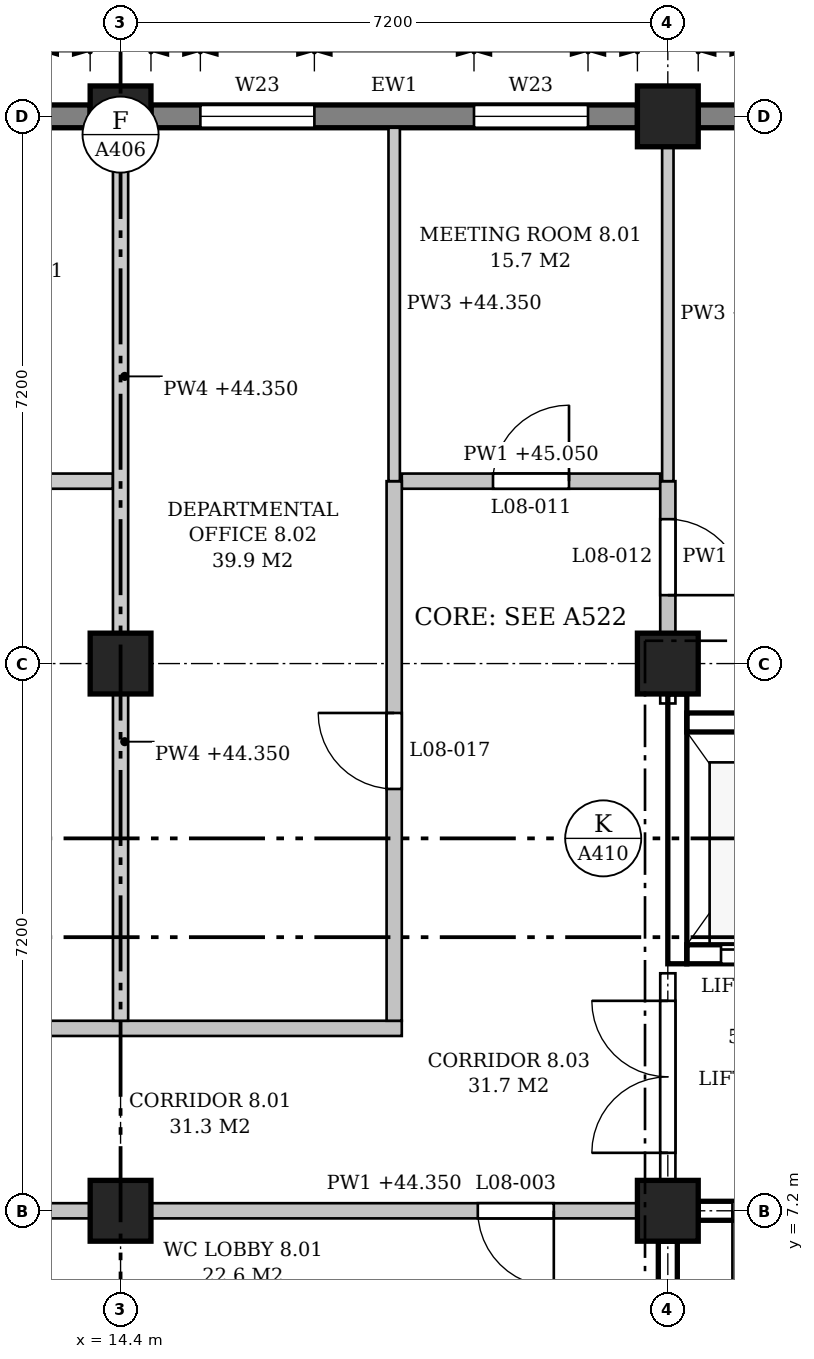
"""IFC4 building model, lengths in metres.
Left out: names, types, materials, properties, quantities, classifications, styles, units other than length and angle.
Written with IfcOpenShell. Run it as: python <this file> out.ifc"""

import sys

from ifc_helpers import new_model, si_unit, direction, frame, frame_2d, origin, origin_2d, place, context, subcontext, project, spatial, polyline, rectangle, outline, extrude, element, fill, save


model = new_model("IFC4")
c1 = context("Model", 3, precision=1e-05, world=origin(), true_north=direction((0.0, 1.0)))
c2 = subcontext(c1, "Body", "Model", "MODEL_VIEW")
j1 = project(units=[si_unit("LENGTHUNIT", "METRE"), si_unit("PLANEANGLEUNIT", "RADIAN")], contexts=[c1])
p1 = place(None, origin())
s1 = spatial("IfcSite", under=j1, at=p1, CompositionType="ELEMENT")
p2 = place(p1, origin())
s2 = spatial("IfcBuilding", under=s1, at=p2, CompositionType="ELEMENT")
p3 = place(p2, frame((0.0, 0.0, 40.8)))
s3 = spatial("IfcBuildingStorey", under=s2, at=p3, CompositionType="ELEMENT", Elevation=40.8)
for number, where, z_axis, x_axis in (
    (1, (14.4, 7.2, 0.0), (0.0, 0.0, 1.0), (1.0, 0.0, 0.0)),
    (2, (14.4, 14.4, 0.0), (0.0, 0.0, 1.0), (1.0, 0.0, 0.0)),
    (3, (14.4, 21.6, 0.0), (0.0, 0.0, 1.0), (1.0, 0.0, 0.0)),
    (4, (21.6, 7.2, 0.0), (0.0, 0.0, 1.0), (1.0, 0.0, 0.0)),
    (5, (21.6, 14.4, 0.0), (0.0, 0.0, 1.0), (1.0, 0.0, 0.0)),
    (6, (21.6, 21.6, 0.0), (0.0, 0.0, 1.0), (1.0, 0.0, 0.0)),
):
    element("IfcColumn", number, at=place(p3, frame(where, z_axis=z_axis, x_axis=x_axis)), inside=s3, PredefinedType="COLUMN", context=c2, shape_type="SweptSolid", body=[
        extrude(rectangle(XDim=0.8, YDim=0.8, at=origin_2d()), origin(), (0.0, 0.0, 1.0), 4.5),
    ])
p4 = place(p3, frame((28.4, 21.6, 0.0), z_axis=(0.0, 0.0, 1.0), x_axis=(-1.0, 0.0, 0.0)))
e7 = element("IfcWall", 7, at=p4, inside=s3, PredefinedType="STANDARD", context=c2, shape_type="SweptSolid", body=[
    extrude(rectangle(XDim=6.4, YDim=0.3, at=frame_2d((3.2, 0.0))), origin(), (0.0, 0.0, 1.0), 3.65),
])
p5 = place(p4, frame((0.65, 0.0, 0.9)))
e8 = element("IfcOpeningElement", 8, at=p5, cuts=e7, PredefinedType="OPENING", context=c2, shape_type="SweptSolid", body=[
    extrude(outline(polyline([(0.0, 0.0), (1.5, 0.0), (1.5, 1.95), (0.75, 2.7), (0.0, 1.95), (0.0, 0.0)])), frame((0.0, 0.16, 0.0), z_axis=(0.0, -1.0, 0.0), x_axis=(1.0, 0.0, 0.0)), (0.0, 0.0, 1.0), 0.32),
])
p6 = place(p4, frame((4.25, 0.0, 0.9)))
e9 = element("IfcOpeningElement", 9, at=p6, cuts=e7, PredefinedType="OPENING", context=c2, shape_type="SweptSolid", body=[
    extrude(outline(polyline([(0.0, 0.0), (1.5, 0.0), (1.5, 1.95), (0.75, 2.7), (0.0, 1.95), (0.0, 0.0)])), frame((0.0, 0.16, 0.0), z_axis=(0.0, -1.0, 0.0), x_axis=(1.0, 0.0, 0.0)), (0.0, 0.0, 1.0), 0.32),
])
p7 = place(p3, frame((21.2, 21.6, 0.0), z_axis=(0.0, 0.0, 1.0), x_axis=(-1.0, 0.0, 0.0)))
e10 = element("IfcWall", 10, at=p7, inside=s3, PredefinedType="STANDARD", context=c2, shape_type="SweptSolid", body=[
    extrude(rectangle(XDim=6.4, YDim=0.3, at=frame_2d((3.2, 0.0))), origin(), (0.0, 0.0, 1.0), 3.65),
])
p8 = place(p7, frame((0.65, 0.0, 0.9)))
e11 = element("IfcOpeningElement", 11, at=p8, cuts=e10, PredefinedType="OPENING", context=c2, shape_type="SweptSolid", body=[
    extrude(outline(polyline([(0.0, 0.0), (1.5, 0.0), (1.5, 1.95), (0.75, 2.7), (0.0, 1.95), (0.0, 0.0)])), frame((0.0, 0.16, 0.0), z_axis=(0.0, -1.0, 0.0), x_axis=(1.0, 0.0, 0.0)), (0.0, 0.0, 1.0), 0.32),
])
p9 = place(p7, frame((4.25, 0.0, 0.9)))
e12 = element("IfcOpeningElement", 12, at=p9, cuts=e10, PredefinedType="OPENING", context=c2, shape_type="SweptSolid", body=[
    extrude(outline(polyline([(0.0, 0.0), (1.5, 0.0), (1.5, 1.95), (0.75, 2.7), (0.0, 1.95), (0.0, 0.0)])), frame((0.0, 0.16, 0.0), z_axis=(0.0, -1.0, 0.0), x_axis=(1.0, 0.0, 0.0)), (0.0, 0.0, 1.0), 0.32),
])
p10 = place(p3, frame((14.0, 21.6, 0.0), z_axis=(0.0, 0.0, 1.0), x_axis=(-1.0, 0.0, 0.0)))
e13 = element("IfcWall", 13, at=p10, inside=s3, PredefinedType="STANDARD", context=c2, shape_type="SweptSolid", body=[
    extrude(rectangle(XDim=6.4, YDim=0.3, at=frame_2d((3.2, 0.0))), origin(), (0.0, 0.0, 1.0), 3.65),
])
p11 = place(p10, frame((0.65, 0.0, 0.9)))
e14 = element("IfcOpeningElement", 14, at=p11, cuts=e13, PredefinedType="OPENING", context=c2, shape_type="SweptSolid", body=[
    extrude(outline(polyline([(0.0, 0.0), (1.5, 0.0), (1.5, 1.95), (0.75, 2.7), (0.0, 1.95), (0.0, 0.0)])), frame((0.0, 0.16, 0.0), z_axis=(0.0, -1.0, 0.0), x_axis=(1.0, 0.0, 0.0)), (0.0, 0.0, 1.0), 0.32),
])
p12 = place(p10, frame((4.25, 0.0, 0.9)))
e15 = element("IfcOpeningElement", 15, at=p12, cuts=e13, PredefinedType="OPENING", context=c2, shape_type="SweptSolid", body=[
    extrude(outline(polyline([(0.0, 0.0), (1.5, 0.0), (1.5, 1.95), (0.75, 2.7), (0.0, 1.95), (0.0, 0.0)])), frame((0.0, 0.16, 0.0), z_axis=(0.0, -1.0, 0.0), x_axis=(1.0, 0.0, 0.0)), (0.0, 0.0, 1.0), 0.32),
])
p13 = place(p3, frame((22.0, 7.2, 0.0), z_axis=(0.0, 0.0, 1.0), x_axis=(1.0, 0.0, 0.0)))
e16 = element("IfcWall", 16, at=p13, inside=s3, PredefinedType="SHEAR", context=c2, shape_type="SweptSolid", body=[
    extrude(rectangle(XDim=6.4, YDim=0.25, at=frame_2d((3.2, 0.0))), origin(), (0.0, 0.0, 1.0), 3.55),
])
p14 = place(p13, frame((0.45, 0.0, 0.0)))
e17 = element("IfcOpeningElement", 17, at=p14, cuts=e16, PredefinedType="OPENING", context=c2, shape_type="SweptSolid", body=[
    extrude(rectangle(XDim=1.1, YDim=2.1, at=frame_2d((0.55, 1.05))), frame((0.0, 0.135, 0.0), z_axis=(0.0, -1.0, 0.0), x_axis=(1.0, 0.0, 0.0)), (0.0, 0.0, 1.0), 0.27),
])
p15 = place(p3, frame((21.6, 0.4, 0.0), z_axis=(0.0, 0.0, 1.0), x_axis=(0.0, 1.0, 0.0)))
e18 = element("IfcWall", 18, at=p15, inside=s3, PredefinedType="SHEAR", context=c2, shape_type="SweptSolid", body=[
    extrude(rectangle(XDim=6.4, YDim=0.25, at=frame_2d((3.2, 0.0))), origin(), (0.0, 0.0, 1.0), 3.55),
])
p16 = place(p3, frame((21.725, 10.45, -0.25), z_axis=(0.0, 0.0, 1.0), x_axis=(0.0, 1.0, 0.0)))
e19 = element("IfcWall", 19, at=p16, inside=s3, PredefinedType="SHEAR", context=c2, shape_type="SweptSolid", body=[
    extrude(rectangle(XDim=3.55, YDim=0.25, at=frame_2d((1.775, 0.0))), origin(), (0.0, 0.0, 1.0), 3.8),
])
p17 = place(p3, frame((21.85, 10.575, -0.25), z_axis=(0.0, 0.0, 1.0), x_axis=(1.0, 0.0, 0.0)))
e20 = element("IfcWall", 20, at=p17, inside=s3, PredefinedType="SHEAR", context=c2, shape_type="SweptSolid", body=[
    extrude(rectangle(XDim=2.0, YDim=0.25, at=frame_2d((1.0, 0.0))), origin(), (0.0, 0.0, 1.0), 4.5),
])
p18 = place(p17, frame((0.45, 0.0, 0.25)))
e21 = element("IfcOpeningElement", 21, at=p18, cuts=e20, PredefinedType="OPENING", context=c2, shape_type="SweptSolid", body=[
    extrude(rectangle(XDim=1.1, YDim=2.1, at=frame_2d((0.55, 1.05))), frame((0.0, 0.135, 0.0), z_axis=(0.0, -1.0, 0.0), x_axis=(1.0, 0.0, 0.0)), (0.0, 0.0, 1.0), 0.27),
])
p19 = place(p3, frame((21.85, 13.625, -0.25), z_axis=(0.0, 0.0, 1.0), x_axis=(1.0, 0.0, 0.0)))
e22 = element("IfcWall", 22, at=p19, inside=s3, PredefinedType="SHEAR", context=c2, shape_type="SweptSolid", body=[
    extrude(rectangle(XDim=2.0, YDim=0.25, at=frame_2d((1.0, 0.0))), origin(), (0.0, 0.0, 1.0), 4.5),
])
p20 = place(p3, frame((7.6, 7.2, 0.0), z_axis=(0.0, 0.0, 1.0), x_axis=(1.0, 0.0, 0.0)))
e23 = element("IfcWall", 23, at=p20, inside=s3, PredefinedType="PARTITIONING", context=c2, shape_type="SweptSolid", body=[
    extrude(rectangle(XDim=6.4, YDim=0.2, at=frame_2d((3.2, 0.0))), origin(), (0.0, 0.0, 1.0), 3.55),
])
p21 = place(p20, frame((2.7, 0.0, 0.0)))
e24 = element("IfcOpeningElement", 24, at=p21, cuts=e23, PredefinedType="OPENING", context=c2, shape_type="SweptSolid", body=[
    extrude(rectangle(XDim=1.0, YDim=2.1, at=frame_2d((0.5, 1.05))), frame((0.0, 0.11, 0.0), z_axis=(0.0, -1.0, 0.0), x_axis=(1.0, 0.0, 0.0)), (0.0, 0.0, 1.0), 0.22),
])
p22 = place(p3, frame((14.8, 7.2, 0.0), z_axis=(0.0, 0.0, 1.0), x_axis=(1.0, 0.0, 0.0)))
e25 = element("IfcWall", 25, at=p22, inside=s3, PredefinedType="PARTITIONING", context=c2, shape_type="SweptSolid", body=[
    extrude(rectangle(XDim=6.4, YDim=0.2, at=frame_2d((3.2, 0.0))), origin(), (0.0, 0.0, 1.0), 3.55),
])
p23 = place(p22, frame((4.3, 0.0, 0.0)))
e26 = element("IfcOpeningElement", 26, at=p23, cuts=e25, PredefinedType="OPENING", context=c2, shape_type="SweptSolid", body=[
    extrude(rectangle(XDim=1.0, YDim=2.1, at=frame_2d((0.5, 1.05))), frame((0.0, 0.11, 0.0), z_axis=(0.0, -1.0, 0.0), x_axis=(1.0, 0.0, 0.0)), (0.0, 0.0, 1.0), 0.22),
])
p24 = place(p3, frame((3.5, 9.6, 0.0), z_axis=(0.0, 0.0, 1.0), x_axis=(1.0, 0.0, 0.0)))
e27 = element("IfcWall", 27, at=p24, inside=s3, PredefinedType="PARTITIONING", context=c2, shape_type="SweptSolid", body=[
    extrude(outline(polyline([(0.0, 0.0), (14.6, 0.0), (14.6, 4.25), (11.125, 4.25), (11.125, 3.55), (10.675, 3.55), (10.675, 4.25), (3.925, 4.25), (3.925, 3.55), (3.475, 3.55), (3.475, 4.25), (0.0, 4.25), (0.0, 0.0)])), frame((0.0, 0.1, 0.0), z_axis=(0.0, -1.0, 0.0), x_axis=(1.0, 0.0, 0.0)), (0.0, 0.0, 1.0), 0.2),
])
p25 = place(p24, frame((5.0, 0.0, 0.0)))
e28 = element("IfcOpeningElement", 28, at=p25, cuts=e27, PredefinedType="OPENING", context=c2, shape_type="SweptSolid", body=[
    extrude(rectangle(XDim=1.0, YDim=2.1, at=frame_2d((0.5, 1.05))), frame((0.0, 0.11, 0.0), z_axis=(0.0, -1.0, 0.0), x_axis=(1.0, 0.0, 0.0)), (0.0, 0.0, 1.0), 0.22),
])
p26 = place(p3, frame((3.7, 16.8, 0.0), z_axis=(0.0, 0.0, 1.0), x_axis=(1.0, 0.0, 0.0)))
e29 = element("IfcWall", 29, at=p26, inside=s3, PredefinedType="PARTITIONING", context=c2, shape_type="SweptSolid", body=[
    extrude(outline(polyline([(0.0, 0.0), (10.6, 0.0), (10.6, 3.55), (10.475, 3.55), (10.475, 4.25), (3.725, 4.25), (3.725, 3.55), (3.275, 3.55), (3.275, 4.25), (0.0, 4.25), (0.0, 0.0)])), frame((0.0, 0.1, 0.0), z_axis=(0.0, -1.0, 0.0), x_axis=(1.0, 0.0, 0.0)), (0.0, 0.0, 1.0), 0.2),
])
p27 = place(p26, frame((1.25, 0.0, 0.0)))
e30 = element("IfcOpeningElement", 30, at=p27, cuts=e29, PredefinedType="OPENING", context=c2, shape_type="SweptSolid", body=[
    extrude(rectangle(XDim=1.0, YDim=2.1, at=frame_2d((0.5, 1.05))), frame((0.0, 0.11, 0.0), z_axis=(0.0, -1.0, 0.0), x_axis=(1.0, 0.0, 0.0)), (0.0, 0.0, 1.0), 0.22),
])
p28 = place(p26, frame((6.55, 0.0, 0.0)))
e31 = element("IfcOpeningElement", 31, at=p28, cuts=e29, PredefinedType="OPENING", context=c2, shape_type="SweptSolid", body=[
    extrude(rectangle(XDim=1.0, YDim=2.1, at=frame_2d((0.5, 1.05))), frame((0.0, 0.11, 0.0), z_axis=(0.0, -1.0, 0.0), x_axis=(1.0, 0.0, 0.0)), (0.0, 0.0, 1.0), 0.22),
])
p29 = place(p3, frame((18.1, 16.8, 0.0), z_axis=(0.0, 0.0, 1.0), x_axis=(1.0, 0.0, 0.0)))
e32 = element("IfcWall", 32, at=p29, inside=s3, PredefinedType="PARTITIONING", context=c2, shape_type="SweptSolid", body=[
    extrude(outline(polyline([(0.0, 0.0), (3.4, 0.0), (3.4, 3.55), (3.275, 3.55), (3.275, 4.25), (0.0, 4.25), (0.0, 0.0)])), frame((0.0, 0.1, 0.0), z_axis=(0.0, -1.0, 0.0), x_axis=(1.0, 0.0, 0.0)), (0.0, 0.0, 1.0), 0.2),
])
p30 = place(p29, frame((1.2, 0.0, 0.0)))
e33 = element("IfcOpeningElement", 33, at=p30, cuts=e32, PredefinedType="OPENING", context=c2, shape_type="SweptSolid", body=[
    extrude(rectangle(XDim=1.0, YDim=2.1, at=frame_2d((0.5, 1.05))), frame((0.0, 0.11, 0.0), z_axis=(0.0, -1.0, 0.0), x_axis=(1.0, 0.0, 0.0)), (0.0, 0.0, 1.0), 0.22),
])
p31 = place(p3, frame((14.4, 9.7, 0.0), z_axis=(0.0, 0.0, 1.0), x_axis=(0.0, 1.0, 0.0)))
e34 = element("IfcWall", 34, at=p31, inside=s3, PredefinedType="PARTITIONING", context=c2, shape_type="SweptSolid", body=[
    extrude(rectangle(XDim=4.3, YDim=0.2, at=frame_2d((2.15, 0.0))), origin(), (0.0, 0.0, 1.0), 3.55),
])
p32 = place(p3, frame((14.4, 14.8, 0.0), z_axis=(0.0, 0.0, 1.0), x_axis=(0.0, 1.0, 0.0)))
e35 = element("IfcWall", 35, at=p32, inside=s3, PredefinedType="PARTITIONING", context=c2, shape_type="SweptSolid", body=[
    extrude(rectangle(XDim=6.4, YDim=0.2, at=frame_2d((3.2, 0.0))), origin(), (0.0, 0.0, 1.0), 3.55),
])
p33 = place(p3, frame((18.0, 9.7, 0.0), z_axis=(0.0, 0.0, 1.0), x_axis=(0.0, 1.0, 0.0)))
e36 = element("IfcWall", 36, at=p33, inside=s3, PredefinedType="PARTITIONING", context=c2, shape_type="SweptSolid", body=[
    extrude(outline(polyline([(0.0, 0.0), (7.1, 0.0), (7.1, 4.25), (4.925, 4.25), (4.925, 3.55), (4.475, 3.55), (4.475, 4.25), (0.0, 4.25), (0.0, 0.0)])), frame((0.0, 0.1, 0.0), z_axis=(0.0, -1.0, 0.0), x_axis=(1.0, 0.0, 0.0)), (0.0, 0.0, 1.0), 0.2),
])
p34 = place(p33, frame((3.05, 0.0, 0.0)))
e37 = element("IfcOpeningElement", 37, at=p34, cuts=e36, PredefinedType="OPENING", context=c2, shape_type="SweptSolid", body=[
    extrude(rectangle(XDim=1.0, YDim=2.1, at=frame_2d((0.5, 1.05))), frame((0.0, 0.11, 0.0), z_axis=(0.0, -1.0, 0.0), x_axis=(1.0, 0.0, 0.0)), (0.0, 0.0, 1.0), 0.22),
])
p35 = place(p3, frame((18.0, 16.8, 0.0), z_axis=(0.0, 0.0, 1.0), x_axis=(0.0, 1.0, 0.0)))
e38 = element("IfcWall", 38, at=p35, inside=s3, PredefinedType="PARTITIONING", context=c2, shape_type="SweptSolid", body=[
    extrude(rectangle(XDim=4.65, YDim=0.15, at=frame_2d((2.325, 0.0))), origin(), (0.0, 0.0, 1.0), 3.55),
])
p36 = place(p3, frame((21.6, 7.6, 0.0), z_axis=(0.0, 0.0, 1.0), x_axis=(0.0, 1.0, 0.0)))
e39 = element("IfcWall", 39, at=p36, inside=s3, PredefinedType="PARTITIONING", context=c2, shape_type="SweptSolid", body=[
    extrude(rectangle(XDim=2.725, YDim=0.2, at=frame_2d((1.362, 0.0))), origin(), (0.0, 0.0, 1.0), 3.55),
])
p37 = place(p36, frame((0.362, 0.0, 0.0)))
e40 = element("IfcOpeningElement", 40, at=p37, cuts=e39, PredefinedType="OPENING", context=c2, shape_type="SweptSolid", body=[
    extrude(rectangle(XDim=2.0, YDim=2.4, at=frame_2d((1.0, 1.2))), frame((0.0, 0.11, 0.0), z_axis=(0.0, -1.0, 0.0), x_axis=(1.0, 0.0, 0.0)), (0.0, 0.0, 1.0), 0.22),
])
p38 = place(p3, frame((21.6, 13.875, 0.0), z_axis=(0.0, 0.0, 1.0), x_axis=(0.0, 1.0, 0.0)))
e41 = element("IfcWall", 41, at=p38, inside=s3, PredefinedType="PARTITIONING", context=c2, shape_type="SweptSolid", body=[
    extrude(rectangle(XDim=0.125, YDim=0.2, at=frame_2d((0.062, 0.0))), origin(), (0.0, 0.0, 1.0), 3.55),
])
p39 = place(p3, frame((21.6, 14.8, 0.0), z_axis=(0.0, 0.0, 1.0), x_axis=(0.0, 1.0, 0.0)))
e42 = element("IfcWall", 42, at=p39, inside=s3, PredefinedType="PARTITIONING", context=c2, shape_type="SweptSolid", body=[
    extrude(rectangle(XDim=2.0, YDim=0.2, at=frame_2d((1.0, 0.0))), origin(), (0.0, 0.0, 1.0), 3.55),
])
p40 = place(p39, frame((0.5, 0.0, 0.0)))
e43 = element("IfcOpeningElement", 43, at=p40, cuts=e42, PredefinedType="OPENING", context=c2, shape_type="SweptSolid", body=[
    extrude(rectangle(XDim=1.0, YDim=2.1, at=frame_2d((0.5, 1.05))), frame((0.0, 0.11, 0.0), z_axis=(0.0, -1.0, 0.0), x_axis=(1.0, 0.0, 0.0)), (0.0, 0.0, 1.0), 0.22),
])
p41 = place(p3, frame((21.6, 16.8, 0.0), z_axis=(0.0, 0.0, 1.0), x_axis=(0.0, 1.0, 0.0)))
e44 = element("IfcWall", 44, at=p41, inside=s3, PredefinedType="PARTITIONING", context=c2, shape_type="SweptSolid", body=[
    extrude(rectangle(XDim=4.4, YDim=0.15, at=frame_2d((2.2, 0.0))), origin(), (0.0, 0.0, 1.0), 3.55),
])
p42 = place(p8, origin())
e45 = element("IfcWindow", 45, at=p42, inside=s3, PartitioningType="SINGLE_PANEL", PredefinedType="WINDOW", context=c2, shape_type="SweptSolid", body=[
    extrude(outline(polyline([(0.0, 0.0), (1.5, 0.0), (1.5, 1.95), (0.75, 2.7), (0.0, 1.95), (0.0, 0.0)])), frame((0.0, 0.03, 0.0), z_axis=(0.0, -1.0, 0.0), x_axis=(1.0, 0.0, 0.0)), (0.0, 0.0, 1.0), 0.06),
])
fill(e11, e45)
p43 = place(p9, origin())
e46 = element("IfcWindow", 46, at=p43, inside=s3, PartitioningType="SINGLE_PANEL", PredefinedType="WINDOW", context=c2, shape_type="SweptSolid", body=[
    extrude(outline(polyline([(0.0, 0.0), (1.5, 0.0), (1.5, 1.95), (0.75, 2.7), (0.0, 1.95), (0.0, 0.0)])), frame((0.0, 0.03, 0.0), z_axis=(0.0, -1.0, 0.0), x_axis=(1.0, 0.0, 0.0)), (0.0, 0.0, 1.0), 0.06),
])
fill(e12, e46)
p44 = place(p14, frame((1.1, 0.0, 0.0), z_axis=(0.0, 0.0, 1.0), x_axis=(-1.0, 0.0, 0.0)))
e47 = element("IfcDoor", 47, at=p44, inside=s3, OperationType="SINGLE_SWING_RIGHT", PredefinedType="DOOR", context=c2, shape_type="SweptSolid", body=[
    extrude(rectangle(XDim=1.1, YDim=2.1, at=frame_2d((0.55, 1.05))), frame((0.0, 0.025, 0.0), z_axis=(0.0, -1.0, 0.0), x_axis=(1.0, 0.0, 0.0)), (0.0, 0.0, 1.0), 0.05),
])
fill(e17, e47)
p45 = place(p18, origin())
e48 = element("IfcDoor", 48, at=p45, inside=s3, OperationType="SLIDING_TO_LEFT", PredefinedType="DOOR", context=c2, shape_type="SweptSolid", body=[
    extrude(rectangle(XDim=1.1, YDim=2.1, at=frame_2d((0.55, 1.05))), frame((0.0, 0.025, 0.0), z_axis=(0.0, -1.0, 0.0), x_axis=(1.0, 0.0, 0.0)), (0.0, 0.0, 1.0), 0.05),
])
fill(e21, e48)
p46 = place(p37, origin())
e49 = element("IfcDoor", 49, at=p46, inside=s3, OperationType="DOUBLE_DOOR_SINGLE_SWING", PredefinedType="DOOR", context=c2, shape_type="SweptSolid", body=[
    extrude(rectangle(XDim=2.0, YDim=2.4, at=frame_2d((1.0, 1.2))), frame((0.0, 0.025, 0.0), z_axis=(0.0, -1.0, 0.0), x_axis=(1.0, 0.0, 0.0)), (0.0, 0.0, 1.0), 0.05),
])
fill(e40, e49)
p47 = place(p23, frame((1.0, 0.0, 0.0), z_axis=(0.0, 0.0, 1.0), x_axis=(-1.0, 0.0, 0.0)))
e50 = element("IfcDoor", 50, at=p47, inside=s3, OperationType="SINGLE_SWING_LEFT", PredefinedType="DOOR", context=c2, shape_type="SweptSolid", body=[
    extrude(rectangle(XDim=1.0, YDim=2.1, at=frame_2d((0.5, 1.05))), frame((0.0, 0.025, 0.0), z_axis=(0.0, -1.0, 0.0), x_axis=(1.0, 0.0, 0.0)), (0.0, 0.0, 1.0), 0.05),
])
fill(e26, e50)
p48 = place(p30, origin())
e51 = element("IfcDoor", 51, at=p48, inside=s3, OperationType="SINGLE_SWING_RIGHT", PredefinedType="DOOR", context=c2, shape_type="SweptSolid", body=[
    extrude(rectangle(XDim=1.0, YDim=2.1, at=frame_2d((0.5, 1.05))), frame((0.0, 0.025, 0.0), z_axis=(0.0, -1.0, 0.0), x_axis=(1.0, 0.0, 0.0)), (0.0, 0.0, 1.0), 0.05),
])
fill(e33, e51)
p49 = place(p40, frame((1.0, 0.0, 0.0), z_axis=(0.0, 0.0, 1.0), x_axis=(-1.0, 0.0, 0.0)))
e52 = element("IfcDoor", 52, at=p49, inside=s3, OperationType="SINGLE_SWING_RIGHT", PredefinedType="DOOR", context=c2, shape_type="SweptSolid", body=[
    extrude(rectangle(XDim=1.0, YDim=2.1, at=frame_2d((0.5, 1.05))), frame((0.0, 0.025, 0.0), z_axis=(0.0, -1.0, 0.0), x_axis=(1.0, 0.0, 0.0)), (0.0, 0.0, 1.0), 0.05),
])
fill(e43, e52)
p50 = place(p34, origin())
e53 = element("IfcDoor", 53, at=p50, inside=s3, OperationType="SINGLE_SWING_RIGHT", PredefinedType="DOOR", context=c2, shape_type="SweptSolid", body=[
    extrude(rectangle(XDim=1.0, YDim=2.1, at=frame_2d((0.5, 1.05))), frame((0.0, 0.025, 0.0), z_axis=(0.0, -1.0, 0.0), x_axis=(1.0, 0.0, 0.0)), (0.0, 0.0, 1.0), 0.05),
])
fill(e37, e53)
save(model, sys.argv[1])
